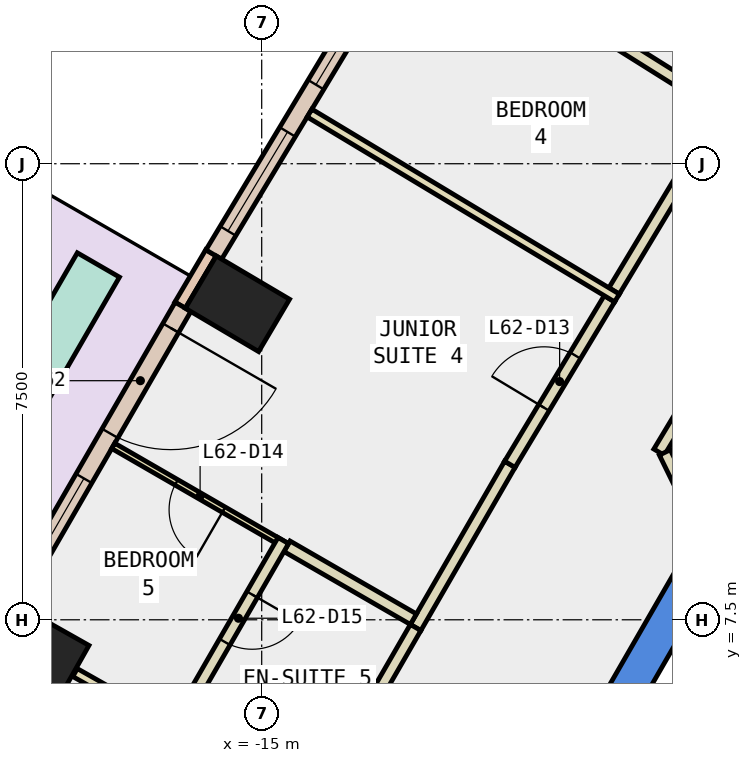
"""IFC4 building model, lengths in metres.
Left out: names, types, materials, properties, quantities, classifications, styles, units other than length and angle.
Written with IfcOpenShell. Run it as: python <this file> out.ifc"""

import sys

from ifc_helpers import new_model, si_unit, direction, frame, frame_2d, origin, origin_2d, place, context, subcontext, project, spatial, polyline, rectangle, outline, extrude, element, fill, save


model = new_model("IFC4")
c1 = context("Model", 3, precision=1e-05, world=origin(), true_north=direction((0.0, 1.0)))
c2 = subcontext(c1, "Body", "Model", "MODEL_VIEW")
j1 = project(units=[si_unit("LENGTHUNIT", "METRE"), si_unit("PLANEANGLEUNIT", "RADIAN")], contexts=[c1])
p1 = place(None, origin())
s1 = spatial("IfcSite", under=j1, at=p1, CompositionType="ELEMENT")
p2 = place(p1, origin())
s2 = spatial("IfcBuilding", under=s1, at=p2, CompositionType="ELEMENT")
p3 = place(p2, frame((0.0, 0.0, 270.2)))
s3 = spatial("IfcBuildingStorey", under=s2, at=p3, CompositionType="ELEMENT", Elevation=270.2)
for number, where, z_axis, x_axis in (
    (1, (-15.399, 12.697, -0.34), (0.0, 0.0, 1.0), (0.509, 0.861, 0.0)),
    (2, (-18.696, 6.987, -0.34), (0.0, 0.0, 1.0), (0.491, 0.871, 0.0)),
):
    element("IfcColumn", number, at=place(p3, frame(where, z_axis=z_axis, x_axis=x_axis)), inside=s3, PredefinedType="COLUMN", context=c2, shape_type="SweptSolid", body=[
        extrude(rectangle(XDim=1.0, YDim=1.4, at=origin_2d()), origin(), (0.0, 0.0, 1.0), 3.6),
    ])
p4 = place(p3, frame((0.0, 0.0, -0.34)))
e3 = element("IfcWall", 3, at=p4, inside=s3, PredefinedType="SHEAR", context=c2, shape_type="SweptSolid", body=[
    extrude(outline(polyline([(-10.535, 4.253), (-10.015, 3.953), (-5.427, 11.9), (-5.774, 12.5), (-10.535, 4.253)])), origin(), (0.0, 0.0, 1.0), 3.6),
])
p5 = place(p3, frame((-15.834, 13.535, 0.0), z_axis=(0.0, 0.0, 1.0), x_axis=(-0.508268432768, -0.861198699634, 0.0)))
e4 = element("IfcWall", 4, at=p5, inside=s3, PredefinedType="STANDARD", context=c2, shape_type="SweptSolid", body=[
    extrude(rectangle(XDim=1.0, YDim=0.2, at=frame_2d((0.5, 0.0))), origin(), (0.0, 0.0, 1.0), 3.26),
])
p6 = place(p3, frame((-12.895, 18.316, 0.0), z_axis=(0.0, 0.0, 1.0), x_axis=(-0.515435742129, -0.856928232547, 0.0)))
e5 = element("IfcWall", 5, at=p6, inside=s3, PredefinedType="STANDARD", context=c2, shape_type="SweptSolid", body=[
    extrude(rectangle(XDim=5.613, YDim=0.3, at=frame_2d((2.806, 0.0))), origin(), (0.0, 0.0, 1.0), 3.26),
])
p7 = place(p6, frame((0.453, 0.0, 0.9)))
e6 = element("IfcOpeningElement", 6, at=p7, cuts=e5, PredefinedType="OPENING", context=c2, shape_type="SweptSolid", body=[
    extrude(rectangle(XDim=1.9, YDim=2.0, at=frame_2d((0.95, 1.0))), frame((0.0, 0.16, 0.0), z_axis=(0.0, -1.0, 0.0), x_axis=(1.0, 0.0, 0.0)), (0.0, 0.0, 1.0), 0.32),
])
p8 = place(p6, frame((3.26, 0.0, 0.9)))
e7 = element("IfcOpeningElement", 7, at=p8, cuts=e5, PredefinedType="OPENING", context=c2, shape_type="SweptSolid", body=[
    extrude(rectangle(XDim=1.9, YDim=2.0, at=frame_2d((0.95, 1.0))), frame((0.0, 0.16, 0.0), z_axis=(0.0, -1.0, 0.0), x_axis=(1.0, 0.0, 0.0)), (0.0, 0.0, 1.0), 0.32),
])
p9 = place(p3, frame((-16.294, 12.647, 0.0), z_axis=(0.0, 0.0, 1.0), x_axis=(-0.500041292042, -0.866001562501, 0.0)))
e8 = element("IfcWall", 8, at=p9, inside=s3, PredefinedType="STANDARD", context=c2, shape_type="SweptSolid", body=[
    extrude(rectangle(XDim=5.612, YDim=0.3, at=frame_2d((2.806, 0.0))), origin(), (0.0, 0.0, 1.0), 3.26),
])
p10 = place(p9, frame((0.403, 0.0, 0.0)))
e9 = element("IfcOpeningElement", 9, at=p10, cuts=e8, PredefinedType="OPENING", context=c2, shape_type="SweptSolid", body=[
    extrude(rectangle(XDim=2.0, YDim=2.4, at=frame_2d((1.0, 1.2))), frame((0.0, 0.16, 0.0), z_axis=(0.0, -1.0, 0.0), x_axis=(1.0, 0.0, 0.0)), (0.0, 0.0, 1.0), 0.32),
])
p11 = place(p9, frame((3.259, 0.0, 0.9)))
e10 = element("IfcOpeningElement", 10, at=p11, cuts=e8, PredefinedType="OPENING", context=c2, shape_type="SweptSolid", body=[
    extrude(rectangle(XDim=1.9, YDim=2.0, at=frame_2d((0.95, 1.0))), frame((0.0, 0.16, 0.0), z_axis=(0.0, -1.0, 0.0), x_axis=(1.0, 0.0, 0.0)), (0.0, 0.0, 1.0), 0.32),
])
p12 = place(p3, frame((-17.686, 13.335, 0.0), z_axis=(0.0, 0.0, 1.0), x_axis=(-0.500079142514, -0.865979706011, 0.0)))
e11 = element("IfcWall", 11, at=p12, inside=s3, PredefinedType="STANDARD", context=c2, shape_type="SweptSolid", body=[
    extrude(rectangle(XDim=5.411, YDim=0.8, at=frame_2d((2.706, 0.0))), origin(), (0.0, 0.0, 1.0), 0.8),
])
p13 = place(p3, frame((-6.054, 14.264, 0.0), z_axis=(0.0, 0.0, 1.0), x_axis=(-0.515508653897, -0.856884372455, 0.0)))
e12 = element("IfcWall", 12, at=p13, inside=s3, PredefinedType="PARTITIONING", context=c2, shape_type="SweptSolid", body=[
    extrude(rectangle(XDim=4.677, YDim=0.2, at=frame_2d((2.339, 0.0))), origin(), (0.0, 0.0, 1.0), 3.26),
])
p14 = place(p13, frame((1.839, 0.0, 0.0)))
e13 = element("IfcOpeningElement", 13, at=p14, cuts=e12, PredefinedType="OPENING", context=c2, shape_type="SweptSolid", body=[
    extrude(rectangle(XDim=1.0, YDim=2.1, at=frame_2d((0.5, 1.05))), frame((0.0, 0.11, 0.0), z_axis=(0.0, -1.0, 0.0), x_axis=(1.0, 0.0, 0.0)), (0.0, 0.0, 1.0), 0.22),
])
p15 = place(p3, frame((-8.37, 10.252, 0.0), z_axis=(0.0, 0.0, 1.0), x_axis=(0.440562172885, -0.897722101668, 0.0)))
e14 = element("IfcWall", 14, at=p15, inside=s3, PredefinedType="PARTITIONING", context=c2, shape_type="SweptSolid", body=[
    extrude(rectangle(XDim=1.353, YDim=0.2, at=frame_2d((0.677, 0.0))), origin(), (0.0, 0.0, 1.0), 3.26),
])
p16 = place(p3, frame((-9.204, 12.908, 0.0), z_axis=(0.0, 0.0, 1.0), x_axis=(0.51556943596, 0.856847802532, 0.0)))
e15 = element("IfcWall", 15, at=p16, inside=s3, PredefinedType="PARTITIONING", context=c2, shape_type="SweptSolid", body=[
    extrude(rectangle(XDim=3.176, YDim=0.2, at=frame_2d((1.588, 0.0))), origin(), (0.0, 0.0, 1.0), 3.26),
])
p17 = place(p3, frame((-12.469, 7.373, 0.0), z_axis=(0.0, 0.0, 1.0), x_axis=(0.500129289791, 0.86595074542, 0.0)))
e16 = element("IfcWall", 16, at=p17, inside=s3, PredefinedType="PARTITIONING", context=c2, shape_type="SweptSolid", body=[
    extrude(rectangle(XDim=3.099, YDim=0.2, at=frame_2d((1.55, 0.0))), origin(), (0.0, 0.0, 1.0), 3.26),
])
p18 = place(p3, frame((-10.919, 10.057, 0.0), z_axis=(0.0, 0.0, 1.0), x_axis=(0.515568955032, 0.856848091908, 0.0)))
e17 = element("IfcWall", 17, at=p18, inside=s3, PredefinedType="PARTITIONING", context=c2, shape_type="SweptSolid", body=[
    extrude(rectangle(XDim=3.177, YDim=0.2, at=frame_2d((1.588, 0.0))), origin(), (0.0, 0.0, 1.0), 3.26),
])
p19 = place(p18, frame((1.088, 0.0, 0.0)))
e18 = element("IfcOpeningElement", 18, at=p19, cuts=e17, PredefinedType="OPENING", context=c2, shape_type="SweptSolid", body=[
    extrude(rectangle(XDim=1.0, YDim=2.1, at=frame_2d((0.5, 1.05))), frame((0.0, 0.11, 0.0), z_axis=(0.0, -1.0, 0.0), x_axis=(1.0, 0.0, 0.0)), (0.0, 0.0, 1.0), 0.22),
])
p20 = place(p3, frame((-13.869, 4.948, 0.0), z_axis=(0.0, 0.0, 1.0), x_axis=(0.49994636267, 0.866056369097, 0.0)))
e19 = element("IfcWall", 19, at=p20, inside=s3, PredefinedType="PARTITIONING", context=c2, shape_type="SweptSolid", body=[
    extrude(rectangle(XDim=2.8, YDim=0.2, at=frame_2d((1.4, 0.0))), origin(), (0.0, 0.0, 1.0), 3.26),
])
p21 = place(p3, frame((-9.517, 17.226, 0.0), z_axis=(0.0, 0.0, 1.0), x_axis=(0.847229363594, -0.53122726348, 0.0)))
e20 = element("IfcWall", 20, at=p21, inside=s3, PredefinedType="PARTITIONING", context=c2, shape_type="SweptSolid", body=[
    extrude(rectangle(XDim=2.5, YDim=0.2, at=frame_2d((1.25, 0.0))), origin(), (0.0, 0.0, 1.0), 3.26),
])
p22 = place(p3, frame((-9.157, 12.792, 0.0), z_axis=(0.0, 0.0, 1.0), x_axis=(-0.856933793276, 0.515426497129, 0.0)))
e21 = element("IfcWall", 21, at=p22, inside=s3, PredefinedType="PARTITIONING", context=c2, shape_type="SweptSolid", body=[
    extrude(rectangle(XDim=5.9, YDim=0.15, at=frame_2d((2.95, 0.0))), origin(), (0.0, 0.0, 1.0), 3.26),
])
p23 = place(p3, frame((-14.584, 8.71, 0.0), z_axis=(0.0, 0.0, 1.0), x_axis=(-0.866008176907, 0.50002983664, 0.0)))
e22 = element("IfcWall", 22, at=p23, inside=s3, PredefinedType="PARTITIONING", context=c2, shape_type="SweptSolid", body=[
    extrude(rectangle(XDim=3.3, YDim=0.1, at=frame_2d((1.65, 0.0))), origin(), (0.0, 0.0, 1.0), 3.26),
])
p24 = place(p23, frame((1.2, 0.0, 0.0)))
e23 = element("IfcOpeningElement", 23, at=p24, cuts=e22, PredefinedType="OPENING", context=c2, shape_type="SweptSolid", body=[
    extrude(rectangle(XDim=0.9, YDim=2.1, at=frame_2d((0.45, 1.05))), frame((0.0, 0.06, 0.0), z_axis=(0.0, -1.0, 0.0), x_axis=(1.0, 0.0, 0.0)), (0.0, 0.0, 1.0), 0.12),
])
p25 = place(p3, frame((-12.505, 7.51, 0.0), z_axis=(0.0, 0.0, 1.0), x_axis=(-0.866277021052, 0.499563932643, 0.0)))
e24 = element("IfcWall", 24, at=p25, inside=s3, PredefinedType="PARTITIONING", context=c2, shape_type="SweptSolid", body=[
    extrude(rectangle(XDim=2.4, YDim=0.2, at=frame_2d((1.2, 0.0))), origin(), (0.0, 0.0, 1.0), 3.26),
])
p26 = place(p3, frame((-14.645, 8.803, 0.0), z_axis=(0.0, 0.0, 1.0), x_axis=(-0.500001826776, -0.866024349092, 0.0)))
e25 = element("IfcWall", 25, at=p26, inside=s3, PredefinedType="PARTITIONING", context=c2, shape_type="SweptSolid", body=[
    extrude(rectangle(XDim=2.95, YDim=0.2, at=frame_2d((1.475, 0.0))), origin(), (0.0, 0.0, 1.0), 3.26),
])
p27 = place(p26, frame((1.025, 0.0, 0.0)))
e26 = element("IfcOpeningElement", 26, at=p27, cuts=e25, PredefinedType="OPENING", context=c2, shape_type="SweptSolid", body=[
    extrude(rectangle(XDim=0.9, YDim=2.1, at=frame_2d((0.45, 1.05))), frame((0.0, 0.11, 0.0), z_axis=(0.0, -1.0, 0.0), x_axis=(1.0, 0.0, 0.0)), (0.0, 0.0, 1.0), 0.22),
])
p28 = place(p3, frame((-14.083, 4.377, 0.0), z_axis=(0.0, 0.0, 1.0), x_axis=(-0.870415885751, 0.492317159799, 0.0)))
e27 = element("IfcWall", 27, at=p28, inside=s3, PredefinedType="PARTITIONING", context=c2, shape_type="SweptSolid", body=[
    extrude(rectangle(XDim=4.581, YDim=0.15, at=frame_2d((2.29, 0.0))), origin(), (0.0, 0.0, 1.0), 3.26),
])
p29 = place(p3, frame((-5.03, 9.388, 0.0), z_axis=(0.0, 0.0, 1.0), x_axis=(-0.499978703459, -0.866037698999, 0.0)))
e28 = element("IfcWall", 28, at=p29, inside=s3, PredefinedType="STANDARD", context=c2, shape_type="SweptSolid", body=[
    extrude(rectangle(XDim=6.9, YDim=0.2, at=frame_2d((3.45, 0.0))), origin(), (0.0, 0.0, 1.0), 3.26),
])
p30 = place(p7, origin())
e29 = element("IfcWindow", 29, at=p30, inside=s3, PartitioningType="SINGLE_PANEL", PredefinedType="WINDOW", context=c2, shape_type="SweptSolid", body=[
    extrude(rectangle(XDim=1.9, YDim=2.0, at=frame_2d((0.95, 1.0))), frame((0.0, 0.03, 0.0), z_axis=(0.0, -1.0, 0.0), x_axis=(1.0, 0.0, 0.0)), (0.0, 0.0, 1.0), 0.06),
])
fill(e6, e29)
p31 = place(p8, origin())
e30 = element("IfcWindow", 30, at=p31, inside=s3, PartitioningType="SINGLE_PANEL", PredefinedType="WINDOW", context=c2, shape_type="SweptSolid", body=[
    extrude(rectangle(XDim=1.9, YDim=2.0, at=frame_2d((0.95, 1.0))), frame((0.0, 0.03, 0.0), z_axis=(0.0, -1.0, 0.0), x_axis=(1.0, 0.0, 0.0)), (0.0, 0.0, 1.0), 0.06),
])
fill(e7, e30)
p32 = place(p10, origin())
e31 = element("IfcDoor", 31, at=p32, inside=s3, OperationType="SLIDING_TO_LEFT", PredefinedType="DOOR", context=c2, shape_type="SweptSolid", body=[
    extrude(rectangle(XDim=2.0, YDim=2.4, at=frame_2d((1.0, 1.2))), frame((0.0, 0.025, 0.0), z_axis=(0.0, -1.0, 0.0), x_axis=(1.0, 0.0, 0.0)), (0.0, 0.0, 1.0), 0.05),
])
fill(e9, e31)
p33 = place(p11, origin())
e32 = element("IfcWindow", 32, at=p33, inside=s3, PartitioningType="SINGLE_PANEL", PredefinedType="WINDOW", context=c2, shape_type="SweptSolid", body=[
    extrude(rectangle(XDim=1.9, YDim=2.0, at=frame_2d((0.95, 1.0))), frame((0.0, 0.03, 0.0), z_axis=(0.0, -1.0, 0.0), x_axis=(1.0, 0.0, 0.0)), (0.0, 0.0, 1.0), 0.06),
])
fill(e10, e32)
p34 = place(p19, origin())
e33 = element("IfcDoor", 33, at=p34, inside=s3, OperationType="SINGLE_SWING_LEFT", PredefinedType="DOOR", context=c2, shape_type="SweptSolid", body=[
    extrude(rectangle(XDim=1.0, YDim=2.1, at=frame_2d((0.5, 1.05))), frame((0.0, 0.025, 0.0), z_axis=(0.0, -1.0, 0.0), x_axis=(1.0, 0.0, 0.0)), (0.0, 0.0, 1.0), 0.05),
])
fill(e18, e33)
p35 = place(p24, origin())
e34 = element("IfcDoor", 34, at=p35, inside=s3, OperationType="SINGLE_SWING_LEFT", PredefinedType="DOOR", context=c2, shape_type="SweptSolid", body=[
    extrude(rectangle(XDim=0.9, YDim=2.1, at=frame_2d((0.45, 1.05))), frame((0.0, 0.025, 0.0), z_axis=(0.0, -1.0, 0.0), x_axis=(1.0, 0.0, 0.0)), (0.0, 0.0, 1.0), 0.05),
])
fill(e23, e34)
p36 = place(p27, origin())
e35 = element("IfcDoor", 35, at=p36, inside=s3, OperationType="SINGLE_SWING_LEFT", PredefinedType="DOOR", context=c2, shape_type="SweptSolid", body=[
    extrude(rectangle(XDim=0.9, YDim=2.1, at=frame_2d((0.45, 1.05))), frame((0.0, 0.025, 0.0), z_axis=(0.0, -1.0, 0.0), x_axis=(1.0, 0.0, 0.0)), (0.0, 0.0, 1.0), 0.05),
])
fill(e26, e35)
save(model, sys.argv[1])
